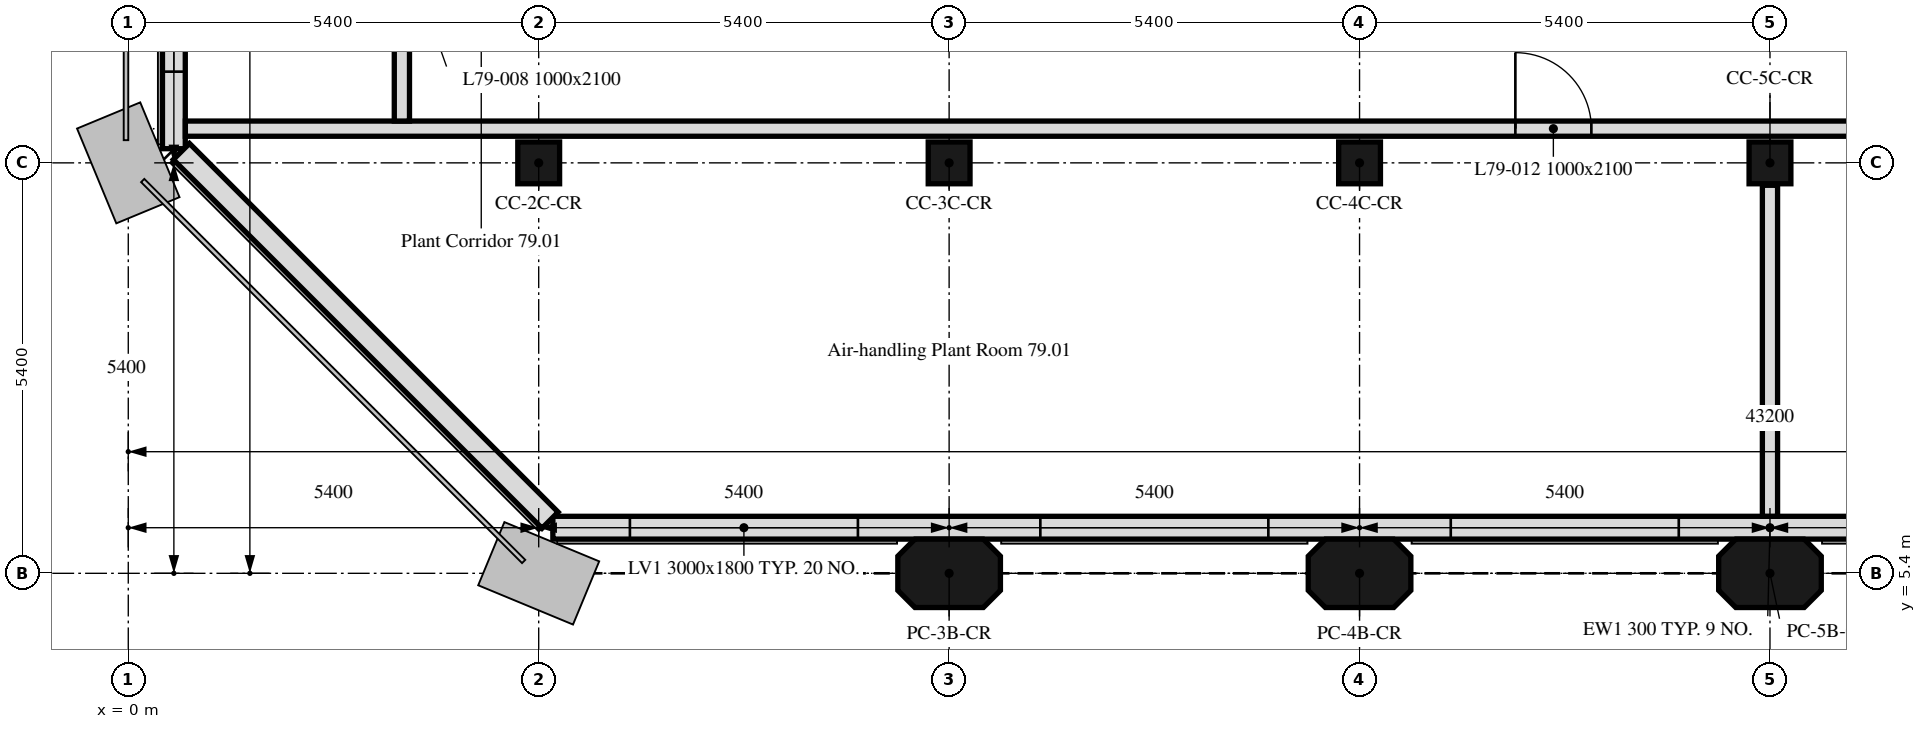
"""IFC4 building model, lengths in metres.
Left out: names, types, materials, properties, quantities, classifications, styles, units other than length and angle.
Written with IfcOpenShell. Run it as: python <this file> out.ifc"""

import sys

from ifc_helpers import new_model, si_unit, direction, frame, frame_2d, origin, origin_2d, place, context, subcontext, project, spatial, polyline, rectangle, outline, extrude, element, fill, save


model = new_model("IFC4")
c1 = context("Model", 3, precision=1e-05, world=origin(), true_north=direction((0.0, 1.0)))
c2 = subcontext(c1, "Body", "Model", "MODEL_VIEW")
j1 = project(units=[si_unit("LENGTHUNIT", "METRE"), si_unit("PLANEANGLEUNIT", "RADIAN")], contexts=[c1])
p1 = place(None, origin())
s1 = spatial("IfcSite", under=j1, at=p1, CompositionType="ELEMENT")
p2 = place(p1, origin())
s2 = spatial("IfcBuilding", under=s1, at=p2, CompositionType="ELEMENT")
p3 = place(p2, frame((0.0, 0.0, 317.2)))
s3 = spatial("IfcBuildingStorey", under=s2, at=p3, CompositionType="ELEMENT", Elevation=317.2)
for number, where, z_axis, x_axis in (
    (1, (10.8, 5.4, 0.0), (0.0, 0.0, 1.0), (1.0, 0.0, 0.0)),
    (2, (16.2, 5.4, 0.0), (0.0, 0.0, 1.0), (1.0, 0.0, 0.0)),
    (3, (21.6, 5.4, 0.0), (0.0, 0.0, 1.0), (1.0, 0.0, 0.0)),
):
    element("IfcColumn", number, at=place(p3, frame(where, z_axis=z_axis, x_axis=x_axis)), inside=s3, PredefinedType="COLUMN", context=c2, shape_type="SweptSolid", body=[
        extrude(outline(polyline([(-0.45, -0.45), (0.45, -0.45), (0.675, -0.225), (0.675, 0.225), (0.45, 0.45), (-0.45, 0.45), (-0.675, 0.225), (-0.675, -0.225), (-0.45, -0.45)])), origin(), (0.0, 0.0, 1.0), 4.2),
    ])
for number, where, z_axis, x_axis in (
    (4, (5.4, 10.8, 0.0), (0.0, 0.0, 1.0), (1.0, 0.0, 0.0)),
    (5, (10.8, 10.8, 0.0), (0.0, 0.0, 1.0), (1.0, 0.0, 0.0)),
    (6, (16.2, 10.8, 0.0), (0.0, 0.0, 1.0), (1.0, 0.0, 0.0)),
    (7, (21.6, 10.8, 0.0), (0.0, 0.0, 1.0), (1.0, 0.0, 0.0)),
):
    element("IfcColumn", number, at=place(p3, frame(where, z_axis=z_axis, x_axis=x_axis)), inside=s3, PredefinedType="COLUMN", context=c2, shape_type="SweptSolid", body=[
        extrude(rectangle(XDim=0.55, YDim=0.55, at=origin_2d()), origin(), (0.0, 0.0, 1.0), 4.2),
    ])
p4 = place(p3, frame((5.586, 6.0, 0.0), z_axis=(0.0, 0.0, 1.0), x_axis=(1.0, 0.0, 0.0)))
e8 = element("IfcWall", 8, at=p4, inside=s3, PredefinedType="SOLIDWALL", context=c2, shape_type="SweptSolid", body=[
    extrude(outline(polyline([(0.0, 0.0), (32.027, 0.0), (32.027, 4.2), (31.434, 4.2), (30.841, 4.2), (30.248, 4.2), (29.655, 4.2), (29.062, 4.2), (28.469, 4.2), (27.875, 4.2), (27.282, 4.2), (26.689, 4.2), (26.096, 4.2), (25.503, 4.2), (24.91, 4.2), (24.317, 4.2), (23.724, 4.2), (23.131, 4.2), (22.538, 4.2), (21.945, 4.2), (21.352, 4.2), (20.758, 4.2), (20.165, 4.2), (19.572, 4.2), (18.979, 4.2), (18.386, 4.2), (17.793, 4.2), (17.2, 4.2), (16.607, 4.2), (16.014, 4.2), (15.42, 4.2), (14.827, 4.2), (14.234, 4.2), (13.641, 4.2), (13.048, 4.2), (12.455, 4.2), (11.862, 4.2), (11.269, 4.2), (10.676, 4.2), (10.083, 4.2), (9.49, 4.2), (8.896, 4.2), (8.303, 4.2), (7.71, 4.2), (7.117, 4.2), (6.524, 4.2), (5.931, 4.2), (5.338, 4.2), (4.745, 4.2), (4.152, 4.2), (3.559, 4.2), (2.966, 4.2), (2.372, 4.2), (1.779, 4.2), (1.186, 4.2), (0.593, 4.2), (0.0, 4.2), (0.0, 0.0)])), frame((0.0, 0.15, 0.0), z_axis=(0.0, -1.0, 0.0), x_axis=(1.0, 0.0, 0.0)), (0.0, 0.0, 1.0), 0.3),
])
p5 = place(p4, frame((1.014, 0.0, 0.6)))
e9 = element("IfcOpeningElement", 9, at=p5, cuts=e8, PredefinedType="OPENING", context=c2, shape_type="SweptSolid", body=[
    extrude(rectangle(XDim=3.0, YDim=1.8, at=frame_2d((1.5, 0.9))), frame((0.0, 0.16, 0.0), z_axis=(0.0, -1.0, 0.0), x_axis=(1.0, 0.0, 0.0)), (0.0, 0.0, 1.0), 0.32),
])
p6 = place(p4, frame((6.414, 0.0, 0.6)))
e10 = element("IfcOpeningElement", 10, at=p6, cuts=e8, PredefinedType="OPENING", context=c2, shape_type="SweptSolid", body=[
    extrude(rectangle(XDim=3.0, YDim=1.8, at=frame_2d((1.5, 0.9))), frame((0.0, 0.16, 0.0), z_axis=(0.0, -1.0, 0.0), x_axis=(1.0, 0.0, 0.0)), (0.0, 0.0, 1.0), 0.32),
])
p7 = place(p4, frame((11.814, 0.0, 0.6)))
e11 = element("IfcOpeningElement", 11, at=p7, cuts=e8, PredefinedType="OPENING", context=c2, shape_type="SweptSolid", body=[
    extrude(rectangle(XDim=3.0, YDim=1.8, at=frame_2d((1.5, 0.9))), frame((0.0, 0.16, 0.0), z_axis=(0.0, -1.0, 0.0), x_axis=(1.0, 0.0, 0.0)), (0.0, 0.0, 1.0), 0.32),
])
p8 = place(p4, frame((17.214, 0.0, 0.6)))
e12 = element("IfcOpeningElement", 12, at=p8, cuts=e8, PredefinedType="OPENING", context=c2, shape_type="SweptSolid", body=[
    extrude(rectangle(XDim=3.0, YDim=1.8, at=frame_2d((1.5, 0.9))), frame((0.0, 0.16, 0.0), z_axis=(0.0, -1.0, 0.0), x_axis=(1.0, 0.0, 0.0)), (0.0, 0.0, 1.0), 0.32),
])
p9 = place(p4, frame((22.614, 0.0, 0.6)))
e13 = element("IfcOpeningElement", 13, at=p9, cuts=e8, PredefinedType="OPENING", context=c2, shape_type="SweptSolid", body=[
    extrude(rectangle(XDim=3.0, YDim=1.8, at=frame_2d((1.5, 0.9))), frame((0.0, 0.16, 0.0), z_axis=(0.0, -1.0, 0.0), x_axis=(1.0, 0.0, 0.0)), (0.0, 0.0, 1.0), 0.32),
])
p10 = place(p4, frame((28.014, 0.0, 0.6)))
e14 = element("IfcOpeningElement", 14, at=p10, cuts=e8, PredefinedType="OPENING", context=c2, shape_type="SweptSolid", body=[
    extrude(rectangle(XDim=3.0, YDim=1.8, at=frame_2d((1.5, 0.9))), frame((0.0, 0.16, 0.0), z_axis=(0.0, -1.0, 0.0), x_axis=(1.0, 0.0, 0.0)), (0.0, 0.0, 1.0), 0.32),
])
p11 = place(p3, frame((0.6, 43.014, 0.0), z_axis=(0.0, 0.0, 1.0), x_axis=(0.0, -1.0, 0.0)))
e15 = element("IfcWall", 15, at=p11, inside=s3, PredefinedType="SOLIDWALL", context=c2, shape_type="SweptSolid", body=[
    extrude(outline(polyline([(0.0, 0.0), (32.027, 0.0), (32.027, 4.2), (31.434, 4.2), (30.841, 4.2), (30.248, 4.2), (29.655, 4.2), (29.062, 4.2), (28.469, 4.2), (27.875, 4.2), (27.282, 4.2), (26.689, 4.2), (26.096, 4.2), (25.503, 4.2), (24.91, 4.2), (24.317, 4.2), (23.724, 4.2), (23.131, 4.2), (22.538, 4.2), (21.945, 4.2), (21.352, 4.2), (20.758, 4.2), (20.165, 4.2), (19.572, 4.2), (18.979, 4.2), (18.386, 4.2), (17.793, 4.2), (17.2, 4.2), (16.607, 4.2), (16.014, 4.2), (15.42, 4.2), (14.827, 4.2), (14.234, 4.2), (13.641, 4.2), (13.048, 4.2), (12.455, 4.2), (11.862, 4.2), (11.269, 4.2), (10.676, 4.2), (10.083, 4.2), (9.49, 4.2), (8.896, 4.2), (8.303, 4.2), (7.71, 4.2), (7.117, 4.2), (6.524, 4.2), (5.931, 4.2), (5.338, 4.2), (4.745, 4.2), (4.152, 4.2), (3.559, 4.2), (2.966, 4.2), (2.372, 4.2), (1.779, 4.2), (1.186, 4.2), (0.593, 4.2), (0.0, 4.2), (0.0, 0.0)])), frame((0.0, 0.15, 0.0), z_axis=(0.0, -1.0, 0.0), x_axis=(1.0, 0.0, 0.0)), (0.0, 0.0, 1.0), 0.3),
])
p12 = place(p11, frame((1.81, 0.0, 0.6)))
e16 = element("IfcOpeningElement", 16, at=p12, cuts=e15, PredefinedType="OPENING", context=c2, shape_type="SweptSolid", body=[
    extrude(rectangle(XDim=3.0, YDim=1.8, at=frame_2d((1.5, 0.9))), frame((0.0, 0.16, 0.0), z_axis=(0.0, -1.0, 0.0), x_axis=(1.0, 0.0, 0.0)), (0.0, 0.0, 1.0), 0.32),
])
p13 = place(p11, frame((6.414, 0.0, 0.6)))
e17 = element("IfcOpeningElement", 17, at=p13, cuts=e15, PredefinedType="OPENING", context=c2, shape_type="SweptSolid", body=[
    extrude(rectangle(XDim=3.0, YDim=1.8, at=frame_2d((1.5, 0.9))), frame((0.0, 0.16, 0.0), z_axis=(0.0, -1.0, 0.0), x_axis=(1.0, 0.0, 0.0)), (0.0, 0.0, 1.0), 0.32),
])
p14 = place(p11, frame((11.814, 0.0, 0.6)))
e18 = element("IfcOpeningElement", 18, at=p14, cuts=e15, PredefinedType="OPENING", context=c2, shape_type="SweptSolid", body=[
    extrude(rectangle(XDim=3.0, YDim=1.8, at=frame_2d((1.5, 0.9))), frame((0.0, 0.16, 0.0), z_axis=(0.0, -1.0, 0.0), x_axis=(1.0, 0.0, 0.0)), (0.0, 0.0, 1.0), 0.32),
])
p15 = place(p11, frame((17.214, 0.0, 0.6)))
e19 = element("IfcOpeningElement", 19, at=p15, cuts=e15, PredefinedType="OPENING", context=c2, shape_type="SweptSolid", body=[
    extrude(rectangle(XDim=3.0, YDim=1.8, at=frame_2d((1.5, 0.9))), frame((0.0, 0.16, 0.0), z_axis=(0.0, -1.0, 0.0), x_axis=(1.0, 0.0, 0.0)), (0.0, 0.0, 1.0), 0.32),
])
p16 = place(p11, frame((22.614, 0.0, 0.6)))
e20 = element("IfcOpeningElement", 20, at=p16, cuts=e15, PredefinedType="OPENING", context=c2, shape_type="SweptSolid", body=[
    extrude(rectangle(XDim=3.0, YDim=1.8, at=frame_2d((1.5, 0.9))), frame((0.0, 0.16, 0.0), z_axis=(0.0, -1.0, 0.0), x_axis=(1.0, 0.0, 0.0)), (0.0, 0.0, 1.0), 0.32),
])
p17 = place(p11, frame((28.014, 0.0, 0.6)))
e21 = element("IfcOpeningElement", 21, at=p17, cuts=e15, PredefinedType="OPENING", context=c2, shape_type="SweptSolid", body=[
    extrude(rectangle(XDim=3.0, YDim=1.8, at=frame_2d((1.5, 0.9))), frame((0.0, 0.16, 0.0), z_axis=(0.0, -1.0, 0.0), x_axis=(1.0, 0.0, 0.0)), (0.0, 0.0, 1.0), 0.32),
])
p18 = place(p3, frame((0.699, 10.949, 0.0), z_axis=(0.0, 0.0, 1.0), x_axis=(0.707106781187, -0.707106781187, 0.0)))
e22 = element("IfcWall", 22, at=p18, inside=s3, PredefinedType="SOLIDWALL", context=c2, shape_type="SweptSolid", body=[
    extrude(outline(polyline([(0.0, 0.0), (6.86, 0.0), (6.86, 4.2), (6.288, 4.2), (5.716, 4.2), (5.145, 4.2), (4.573, 4.2), (4.001, 4.2), (3.43, 4.2), (2.858, 4.2), (2.287, 4.2), (1.715, 4.2), (1.143, 4.2), (0.572, 4.2), (0.0, 4.2), (0.0, 0.0)])), frame((0.0, 0.15, 0.0), z_axis=(0.0, -1.0, 0.0), x_axis=(1.0, 0.0, 0.0)), (0.0, 0.0, 1.0), 0.3),
])
p19 = place(p3, frame((21.6, 10.505, 0.0), z_axis=(0.0, 0.0, 1.0), x_axis=(0.0, -1.0, 0.0)))
e23 = element("IfcWall", 23, at=p19, inside=s3, PredefinedType="PARTITIONING", context=c2, shape_type="SweptSolid", body=[
    extrude(rectangle(XDim=4.354, YDim=0.2, at=frame_2d((2.177, 0.0))), origin(), (0.0, 0.0, 1.0), 4.2),
])
p20 = place(p3, frame((0.751, 11.25, 0.0), z_axis=(0.0, 0.0, 1.0), x_axis=(1.0, 0.0, 0.0)))
e24 = element("IfcWall", 24, at=p20, inside=s3, PredefinedType="PARTITIONING", context=c2, shape_type="SweptSolid", body=[
    extrude(rectangle(XDim=41.698, YDim=0.2, at=frame_2d((20.849, 0.0))), origin(), (0.0, 0.0, 1.0), 4.2),
])
p21 = place(p20, frame((33.866, 0.0, 0.0)))
e25 = element("IfcOpeningElement", 25, at=p21, cuts=e24, PredefinedType="OPENING", context=c2, shape_type="SweptSolid", body=[
    extrude(rectangle(XDim=1.0, YDim=2.1, at=frame_2d((0.5, 1.05))), frame((0.0, 0.1, 0.0), z_axis=(0.0, -1.0, 0.0), x_axis=(1.0, 0.0, 0.0)), (0.0, 0.0, 1.0), 0.2),
])
p22 = place(p20, frame((28.449, 0.0, 0.0)))
e26 = element("IfcOpeningElement", 26, at=p22, cuts=e24, PredefinedType="OPENING", context=c2, shape_type="SweptSolid", body=[
    extrude(rectangle(XDim=1.0, YDim=2.1, at=frame_2d((0.5, 1.05))), frame((0.0, 0.1, 0.0), z_axis=(0.0, -1.0, 0.0), x_axis=(1.0, 0.0, 0.0)), (0.0, 0.0, 1.0), 0.2),
])
p23 = place(p20, frame((23.049, 0.0, 0.0)))
e27 = element("IfcOpeningElement", 27, at=p23, cuts=e24, PredefinedType="OPENING", context=c2, shape_type="SweptSolid", body=[
    extrude(rectangle(XDim=1.0, YDim=2.1, at=frame_2d((0.5, 1.05))), frame((0.0, 0.1, 0.0), z_axis=(0.0, -1.0, 0.0), x_axis=(1.0, 0.0, 0.0)), (0.0, 0.0, 1.0), 0.2),
])
p24 = place(p20, frame((17.499, 0.0, 0.0)))
e28 = element("IfcOpeningElement", 28, at=p24, cuts=e24, PredefinedType="OPENING", context=c2, shape_type="SweptSolid", body=[
    extrude(rectangle(XDim=1.0, YDim=2.1, at=frame_2d((0.5, 1.05))), frame((0.0, 0.1, 0.0), z_axis=(0.0, -1.0, 0.0), x_axis=(1.0, 0.0, 0.0)), (0.0, 0.0, 1.0), 0.2),
])
p25 = place(p3, frame((3.6, 11.35, 0.0), z_axis=(0.0, 0.0, 1.0), x_axis=(0.0, 1.0, 0.0)))
e29 = element("IfcWall", 29, at=p25, inside=s3, PredefinedType="PARTITIONING", context=c2, shape_type="SweptSolid", body=[
    extrude(rectangle(XDim=29.95, YDim=0.2, at=frame_2d((14.975, 0.0))), origin(), (0.0, 0.0, 1.0), 3.45),
])
p26 = place(p25, frame((23.508, 0.0, 0.0)))
e30 = element("IfcOpeningElement", 30, at=p26, cuts=e29, PredefinedType="OPENING", context=c2, shape_type="SweptSolid", body=[
    extrude(rectangle(XDim=1.0, YDim=2.1, at=frame_2d((0.5, 1.05))), frame((0.0, 0.1, 0.0), z_axis=(0.0, -1.0, 0.0), x_axis=(1.0, 0.0, 0.0)), (0.0, 0.0, 1.0), 0.2),
])
p27 = place(p25, frame((17.85, 0.0, 0.0)))
e31 = element("IfcOpeningElement", 31, at=p27, cuts=e29, PredefinedType="OPENING", context=c2, shape_type="SweptSolid", body=[
    extrude(rectangle(XDim=1.0, YDim=2.1, at=frame_2d((0.5, 1.05))), frame((0.0, 0.1, 0.0), z_axis=(0.0, -1.0, 0.0), x_axis=(1.0, 0.0, 0.0)), (0.0, 0.0, 1.0), 0.2),
])
p28 = place(p25, frame((1.875, 0.0, 0.0)))
e32 = element("IfcOpeningElement", 32, at=p28, cuts=e29, PredefinedType="OPENING", context=c2, shape_type="SweptSolid", body=[
    extrude(rectangle(XDim=1.0, YDim=2.1, at=frame_2d((0.5, 1.05))), frame((0.0, 0.1, 0.0), z_axis=(0.0, -1.0, 0.0), x_axis=(1.0, 0.0, 0.0)), (0.0, 0.0, 1.0), 0.2),
])
p29 = place(p25, frame((9.75, 0.0, 0.0)))
e33 = element("IfcOpeningElement", 33, at=p29, cuts=e29, PredefinedType="OPENING", context=c2, shape_type="SweptSolid", body=[
    extrude(rectangle(XDim=1.0, YDim=2.1, at=frame_2d((0.5, 1.05))), frame((0.0, 0.1, 0.0), z_axis=(0.0, -1.0, 0.0), x_axis=(1.0, 0.0, 0.0)), (0.0, 0.0, 1.0), 0.2),
])
p30 = place(p5, origin())
e34 = element("IfcWindow", 34, at=p30, inside=s3, PartitioningType="SINGLE_PANEL", PredefinedType="WINDOW", context=c2, shape_type="SweptSolid", body=[
    extrude(rectangle(XDim=3.0, YDim=1.8, at=frame_2d((1.5, 0.9))), frame((0.0, 0.03, 0.0), z_axis=(0.0, -1.0, 0.0), x_axis=(1.0, 0.0, 0.0)), (0.0, 0.0, 1.0), 0.06),
])
fill(e9, e34)
p31 = place(p6, origin())
e35 = element("IfcWindow", 35, at=p31, inside=s3, PartitioningType="SINGLE_PANEL", PredefinedType="WINDOW", context=c2, shape_type="SweptSolid", body=[
    extrude(rectangle(XDim=3.0, YDim=1.8, at=frame_2d((1.5, 0.9))), frame((0.0, 0.03, 0.0), z_axis=(0.0, -1.0, 0.0), x_axis=(1.0, 0.0, 0.0)), (0.0, 0.0, 1.0), 0.06),
])
fill(e10, e35)
p32 = place(p7, origin())
e36 = element("IfcWindow", 36, at=p32, inside=s3, PartitioningType="SINGLE_PANEL", PredefinedType="WINDOW", context=c2, shape_type="SweptSolid", body=[
    extrude(rectangle(XDim=3.0, YDim=1.8, at=frame_2d((1.5, 0.9))), frame((0.0, 0.03, 0.0), z_axis=(0.0, -1.0, 0.0), x_axis=(1.0, 0.0, 0.0)), (0.0, 0.0, 1.0), 0.06),
])
fill(e11, e36)
p33 = place(p17, origin())
e37 = element("IfcWindow", 37, at=p33, inside=s3, PartitioningType="SINGLE_PANEL", PredefinedType="WINDOW", context=c2, shape_type="SweptSolid", body=[
    extrude(rectangle(XDim=3.0, YDim=1.8, at=frame_2d((1.5, 0.9))), frame((0.0, 0.03, 0.0), z_axis=(0.0, -1.0, 0.0), x_axis=(1.0, 0.0, 0.0)), (0.0, 0.0, 1.0), 0.06),
])
fill(e21, e37)
p34 = place(p24, origin())
e38 = element("IfcDoor", 38, at=p34, inside=s3, OperationType="SINGLE_SWING_RIGHT", PredefinedType="DOOR", context=c2, shape_type="SweptSolid", body=[
    extrude(rectangle(XDim=1.0, YDim=2.1, at=frame_2d((0.5, 1.05))), frame((0.0, 0.025, 0.0), z_axis=(0.0, -1.0, 0.0), x_axis=(1.0, 0.0, 0.0)), (0.0, 0.0, 1.0), 0.05),
])
fill(e28, e38)
save(model, sys.argv[1])
